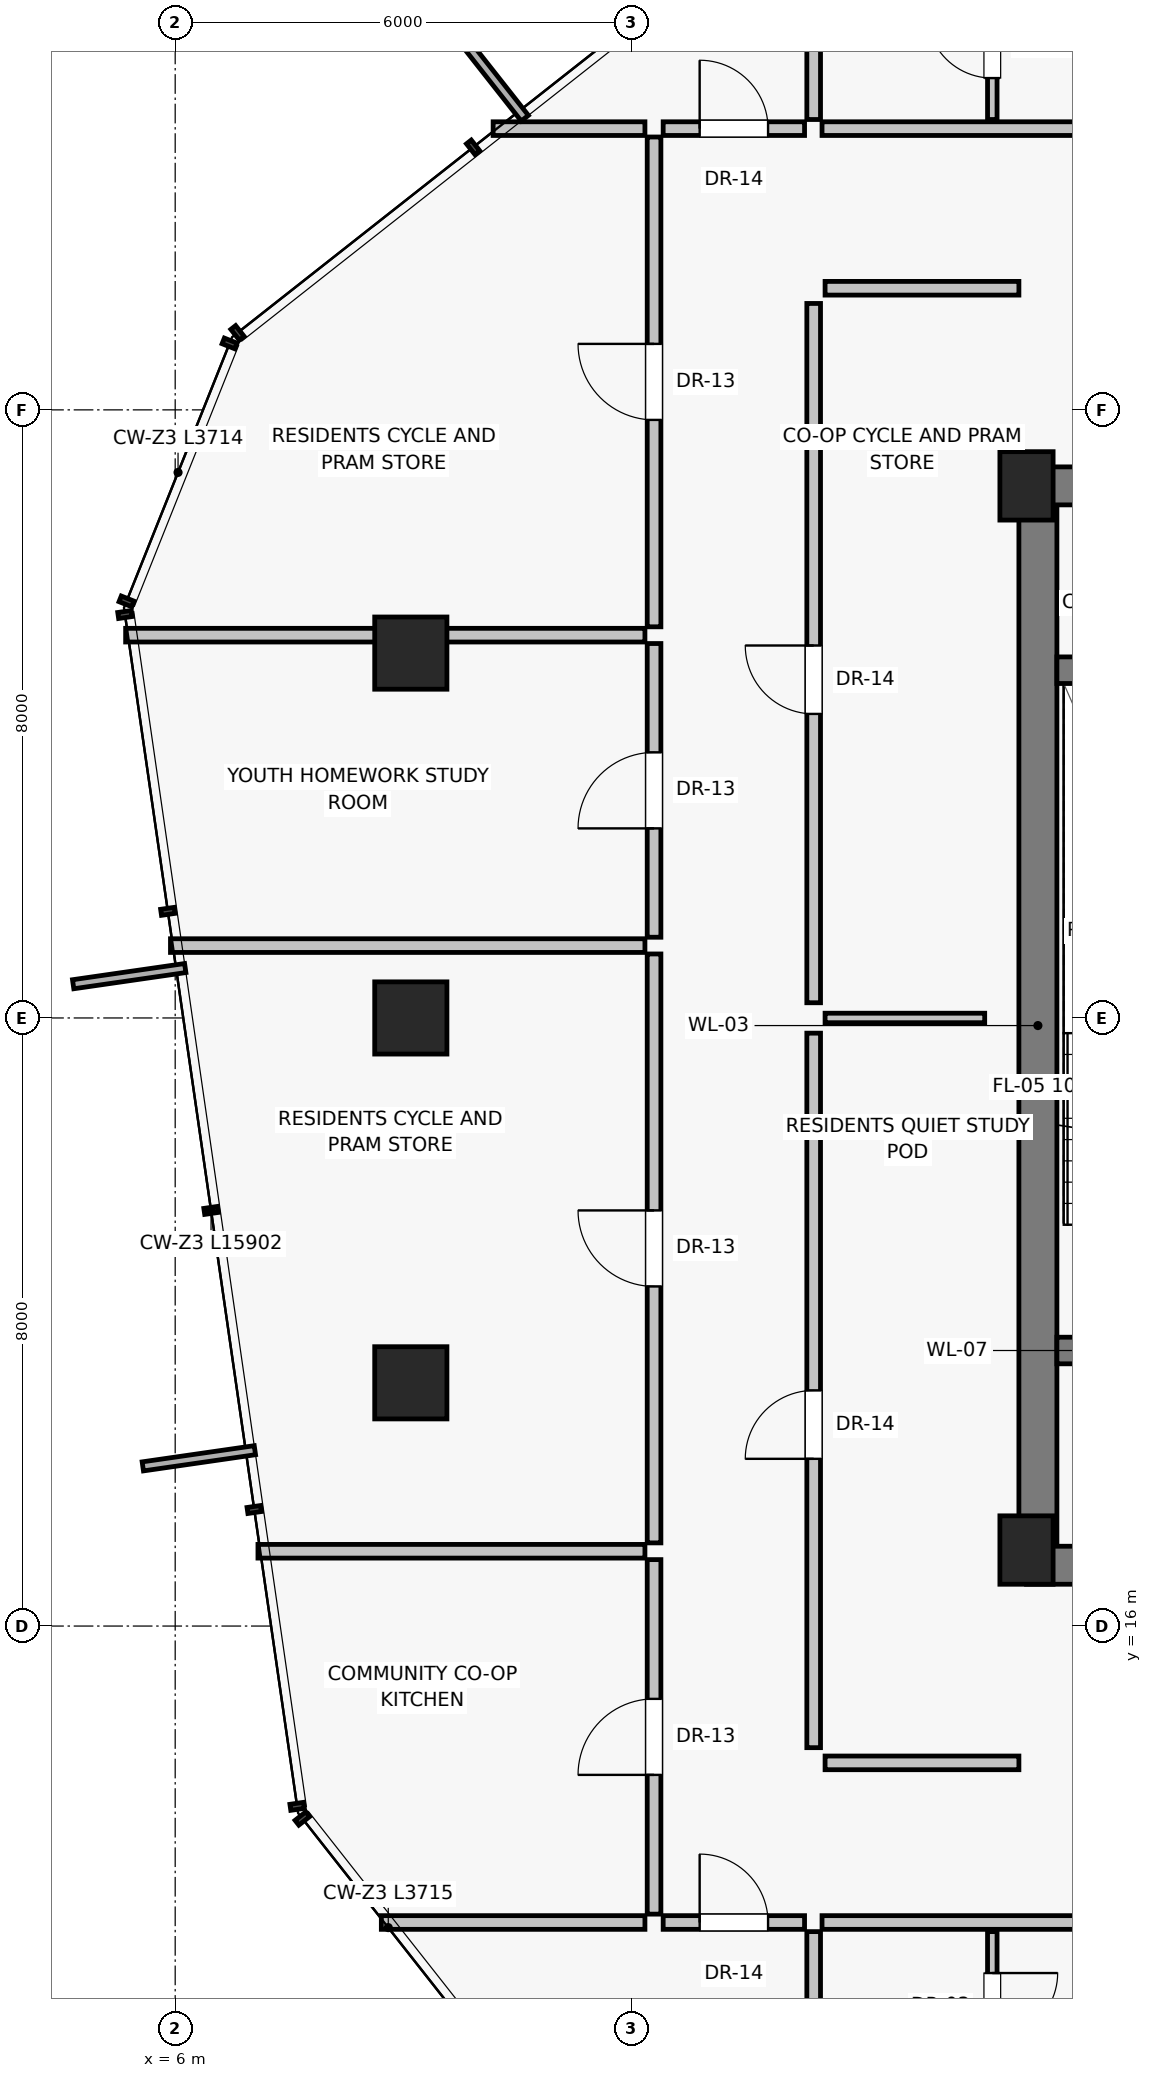
"""IFC4 building model, lengths in metres.
Left out: names, types, materials, properties, quantities, classifications, styles, units other than length and angle.
Written with IfcOpenShell. Run it as: python <this file> out.ifc"""

import sys

from ifc_helpers import new_model, si_unit, direction, frame, frame_2d, origin, origin_2d, place, context, subcontext, project, spatial, rectangle, extrude, source, transform, mapped, element, fill, save


model = new_model("IFC4")
c1 = context("Model", 3, precision=1e-05, world=origin(), true_north=direction((0.0, 1.0)))
c2 = subcontext(c1, "Body", "Model", "MODEL_VIEW")
j1 = project(units=[si_unit("LENGTHUNIT", "METRE"), si_unit("PLANEANGLEUNIT", "RADIAN")], contexts=[c1])
p1 = place(None, origin())
s1 = spatial("IfcSite", under=j1, at=p1, CompositionType="ELEMENT")
p2 = place(p1, origin())
s2 = spatial("IfcBuilding", under=s1, at=p2, CompositionType="ELEMENT")
p3 = place(p2, frame((0.0, 0.0, 178.85)))
s3 = spatial("IfcBuildingStorey", under=s2, at=p3, CompositionType="ELEMENT", Elevation=178.85)
for number, where, z_axis, x_axis in (
    (1, (17.2, 17.0, 0.0), (0.0, 0.0, 1.0), (1.0, 0.0, 0.0)),
    (2, (17.2, 31.0, 0.0), (0.0, 0.0, 1.0), (1.0, 0.0, 0.0)),
):
    element("IfcColumn", number, at=place(p3, frame(where, z_axis=z_axis, x_axis=x_axis)), inside=s3, PredefinedType="PILASTER", context=c2, shape_type="SweptSolid", body=[
        extrude(rectangle(XDim=0.7, YDim=0.9, at=origin_2d()), origin(), (0.0, 0.0, 1.0), 3.25),
    ])
for number, where, z_axis, x_axis in (
    (3, (9.1, 28.8, 0.0), (0.0, 0.0, 1.0), (1.0, 0.0, 0.0)),
    (4, (9.1, 24.0, 0.0), (0.0, 0.0, 1.0), (1.0, 0.0, 0.0)),
    (5, (9.1, 19.2, 0.0), (0.0, 0.0, 1.0), (1.0, 0.0, 0.0)),
):
    element("IfcColumn", number, at=place(p3, frame(where, z_axis=z_axis, x_axis=x_axis)), inside=s3, PredefinedType="COLUMN", context=c2, shape_type="SweptSolid", body=[
        extrude(rectangle(XDim=0.95, YDim=0.95, at=origin_2d()), origin(), (0.0, 0.0, 1.0), 3.25),
    ])
p4 = place(p3, frame((17.35, 16.8, 0.0), z_axis=(0.0, 0.0, 1.0), x_axis=(0.0, 1.0, 0.0)))
e6 = element("IfcWall", 6, at=p4, inside=s3, PredefinedType="SHEAR", context=c2, shape_type="SweptSolid", body=[
    extrude(rectangle(XDim=14.2, YDim=0.5, at=frame_2d((7.1, 0.0))), origin(), (0.0, 0.0, 1.0), 3.015),
])
p5 = place(p3, frame((17.2, 16.8, 0.0), z_axis=(0.0, 0.0, 1.0), x_axis=(1.0, 0.0, 0.0)))
e7 = element("IfcWall", 7, at=p5, inside=s3, PredefinedType="SHEAR", context=c2, shape_type="SweptSolid", body=[
    extrude(rectangle(XDim=5.85, YDim=0.5, at=frame_2d((2.925, 0.0))), origin(), (0.0, 0.0, 1.0), 3.015),
])
p6 = place(p5, frame((1.15, 0.0, 0.0)))
e8 = element("IfcOpeningElement", 8, at=p6, cuts=e7, PredefinedType="OPENING", context=c2, shape_type="SweptSolid", body=[
    extrude(rectangle(XDim=1.2, YDim=2.03, at=frame_2d((0.6, 1.015))), frame((0.0, 0.26, 0.0), z_axis=(0.0, -1.0, 0.0), x_axis=(1.0, 0.0, 0.0)), (0.0, 0.0, 1.0), 0.52),
])
p7 = place(p3, frame((17.2, 31.0, 0.0), z_axis=(0.0, 0.0, 1.0), x_axis=(1.0, 0.0, 0.0)))
e9 = element("IfcWall", 9, at=p7, inside=s3, PredefinedType="SHEAR", context=c2, shape_type="SweptSolid", body=[
    extrude(rectangle(XDim=3.8, YDim=0.5, at=frame_2d((1.9, 0.0))), origin(), (0.0, 0.0, 1.0), 3.015),
])
p8 = place(p7, frame((1.25, 0.0, 0.0)))
e10 = element("IfcOpeningElement", 10, at=p8, cuts=e9, PredefinedType="OPENING", context=c2, shape_type="SweptSolid", body=[
    extrude(rectangle(XDim=0.86, YDim=2.01, at=frame_2d((0.43, 1.005))), frame((0.0, 0.26, 0.0), z_axis=(0.0, -1.0, 0.0), x_axis=(1.0, 0.0, 0.0)), (0.0, 0.0, 1.0), 0.52),
])
p9 = place(p3, frame((17.6, 19.625, 0.0), z_axis=(0.0, 0.0, 1.0), x_axis=(1.0, 0.0, 0.0)))
e11 = element("IfcWall", 11, at=p9, inside=s3, PredefinedType="SHEAR", context=c2, shape_type="SweptSolid", body=[
    extrude(rectangle(XDim=3.375, YDim=0.35, at=frame_2d((1.688, 0.0))), origin(), (0.0, 0.0, 1.0), 3.015),
])
p10 = place(p9, frame((1.05, 0.0, 0.0)))
e12 = element("IfcOpeningElement", 12, at=p10, cuts=e11, PredefinedType="OPENING", context=c2, shape_type="SweptSolid", body=[
    extrude(rectangle(XDim=1.1, YDim=2.03, at=frame_2d((0.55, 1.015))), frame((0.0, 0.185, 0.0), z_axis=(0.0, -1.0, 0.0), x_axis=(1.0, 0.0, 0.0)), (0.0, 0.0, 1.0), 0.37),
])
p11 = place(p3, frame((17.6, 28.575, 0.0), z_axis=(0.0, 0.0, 1.0), x_axis=(1.0, 0.0, 0.0)))
e13 = element("IfcWall", 13, at=p11, inside=s3, PredefinedType="SHEAR", context=c2, shape_type="SweptSolid", body=[
    extrude(rectangle(XDim=3.375, YDim=0.35, at=frame_2d((1.688, 0.0))), origin(), (0.0, 0.0, 1.0), 3.015),
])
p12 = place(p3, frame((14.4, 14.4, 0.0), z_axis=(0.0, 0.0, 1.0), x_axis=(0.0, 1.0, 0.0)))
e14 = element("IfcWall", 14, at=p12, inside=s3, PredefinedType="PARTITIONING", context=c2, shape_type="SweptSolid", body=[
    extrude(rectangle(XDim=9.4, YDim=0.18, at=frame_2d((4.7, 0.0))), origin(), (0.0, 0.0, 1.0), 3.015),
])
p13 = place(p12, frame((3.8, 0.0, 0.0)))
e15 = element("IfcOpeningElement", 15, at=p13, cuts=e14, PredefinedType="OPENING", context=c2, shape_type="SweptSolid", body=[
    extrude(rectangle(XDim=0.9, YDim=2.01, at=frame_2d((0.45, 1.005))), frame((0.0, 0.1, 0.0), z_axis=(0.0, -1.0, 0.0), x_axis=(1.0, 0.0, 0.0)), (0.0, 0.0, 1.0), 0.2),
])
p14 = place(p3, frame((14.4, 24.2, 0.0), z_axis=(0.0, 0.0, 1.0), x_axis=(0.0, 1.0, 0.0)))
e16 = element("IfcWall", 16, at=p14, inside=s3, PredefinedType="PARTITIONING", context=c2, shape_type="SweptSolid", body=[
    extrude(rectangle(XDim=9.2, YDim=0.18, at=frame_2d((4.6, 0.0))), origin(), (0.0, 0.0, 1.0), 3.015),
])
p15 = place(p14, frame((3.8, 0.0, 0.0)))
e17 = element("IfcOpeningElement", 17, at=p15, cuts=e16, PredefinedType="OPENING", context=c2, shape_type="SweptSolid", body=[
    extrude(rectangle(XDim=0.9, YDim=2.01, at=frame_2d((0.45, 1.005))), frame((0.0, 0.1, 0.0), z_axis=(0.0, -1.0, 0.0), x_axis=(1.0, 0.0, 0.0)), (0.0, 0.0, 1.0), 0.2),
])
p16 = place(p3, frame((14.55, 24.0, 0.0), z_axis=(0.0, 0.0, 1.0), x_axis=(1.0, 0.0, 0.0)))
e18 = element("IfcWall", 18, at=p16, inside=s3, PredefinedType="PARTITIONING", context=c2, shape_type="SweptSolid", body=[
    extrude(rectangle(XDim=2.1, YDim=0.125, at=frame_2d((1.05, 0.0))), origin(), (0.0, 0.0, 1.0), 3.015),
])
for number, where, z_axis, x_axis in (
    (19, (14.55, 14.2, 0.0), (0.0, 0.0, 1.0), (1.0, 0.0, 0.0)),
    (20, (14.55, 33.6, 0.0), (0.0, 0.0, 1.0), (1.0, 0.0, 0.0)),
):
    element("IfcWall", number, at=place(p3, frame(where, z_axis=z_axis, x_axis=x_axis)), inside=s3, PredefinedType="PARTITIONING", context=c2, shape_type="SweptSolid", body=[
        extrude(rectangle(XDim=2.55, YDim=0.18, at=frame_2d((1.275, 0.0))), origin(), (0.0, 0.0, 1.0), 3.015),
    ])
p17 = place(p3, frame((14.4, 11.98, 0.0), z_axis=(0.0, 0.0, 1.0), x_axis=(0.0, -1.0, 0.0)))
e21 = element("IfcWall", 21, at=p17, inside=s3, PredefinedType="PARTITIONING", context=c2, shape_type="SweptSolid", body=[
    extrude(rectangle(XDim=3.248, YDim=0.18, at=frame_2d((1.624, 0.0))), origin(), (0.0, 0.0, 1.0), 3.015),
])
p18 = place(p3, frame((14.51, 12.1, 0.0), z_axis=(0.0, 0.0, 1.0), x_axis=(1.0, 0.0, 0.0)))
e22 = element("IfcWall", 22, at=p18, inside=s3, PredefinedType="PARTITIONING", context=c2, shape_type="SweptSolid", body=[
    extrude(rectangle(XDim=7.174, YDim=0.18, at=frame_2d((3.587, 0.0))), origin(), (0.0, 0.0, 1.0), 3.015),
])
p19 = place(p18, frame((4.51, 0.0, 0.0)))
e23 = element("IfcOpeningElement", 23, at=p19, cuts=e22, PredefinedType="OPENING", context=c2, shape_type="SweptSolid", body=[
    extrude(rectangle(XDim=0.95, YDim=2.02, at=frame_2d((0.475, 1.01))), frame((0.0, 0.1, 0.0), z_axis=(0.0, -1.0, 0.0), x_axis=(1.0, 0.0, 0.0)), (0.0, 0.0, 1.0), 0.2),
])
p20 = place(p3, frame((16.75, 11.98, 0.0), z_axis=(0.0, 0.0, 1.0), x_axis=(0.0, -1.0, 0.0)))
e24 = element("IfcWall", 24, at=p20, inside=s3, PredefinedType="PARTITIONING", context=c2, shape_type="SweptSolid", body=[
    extrude(rectangle(XDim=1.95, YDim=0.125, at=frame_2d((0.975, 0.0))), origin(), (0.0, 0.0, 1.0), 3.015),
])
p21 = place(p20, frame((0.545, 0.0, 0.0)))
e25 = element("IfcOpeningElement", 25, at=p21, cuts=e24, PredefinedType="OPENING", context=c2, shape_type="SweptSolid", body=[
    extrude(rectangle(XDim=0.86, YDim=2.01, at=frame_2d((0.43, 1.005))), frame((0.0, 0.073, 0.0), z_axis=(0.0, -1.0, 0.0), x_axis=(1.0, 0.0, 0.0)), (0.0, 0.0, 1.0), 0.145),
])
p22 = place(p3, frame((14.4, 35.82, 0.0), z_axis=(0.0, 0.0, 1.0), x_axis=(0.0, 1.0, 0.0)))
e26 = element("IfcWall", 26, at=p22, inside=s3, PredefinedType="PARTITIONING", context=c2, shape_type="SweptSolid", body=[
    extrude(rectangle(XDim=3.201, YDim=0.18, at=frame_2d((1.6, 0.0))), origin(), (0.0, 0.0, 1.0), 3.015),
])
p23 = place(p3, frame((14.51, 35.7, 0.0), z_axis=(0.0, 0.0, 1.0), x_axis=(1.0, 0.0, 0.0)))
e27 = element("IfcWall", 27, at=p23, inside=s3, PredefinedType="PARTITIONING", context=c2, shape_type="SweptSolid", body=[
    extrude(rectangle(XDim=5.936, YDim=0.18, at=frame_2d((2.968, 0.0))), origin(), (0.0, 0.0, 1.0), 3.015),
])
p24 = place(p23, frame((3.594, 0.0, 0.0)))
e28 = element("IfcOpeningElement", 28, at=p24, cuts=e27, PredefinedType="OPENING", context=c2, shape_type="SweptSolid", body=[
    extrude(rectangle(XDim=0.95, YDim=2.02, at=frame_2d((0.475, 1.01))), frame((0.0, 0.1, 0.0), z_axis=(0.0, -1.0, 0.0), x_axis=(1.0, 0.0, 0.0)), (0.0, 0.0, 1.0), 0.2),
])
p25 = place(p3, frame((16.75, 35.82, 0.0), z_axis=(0.0, 0.0, 1.0), x_axis=(0.0, 1.0, 0.0)))
e29 = element("IfcWall", 29, at=p25, inside=s3, PredefinedType="PARTITIONING", context=c2, shape_type="SweptSolid", body=[
    extrude(rectangle(XDim=1.95, YDim=0.125, at=frame_2d((0.975, 0.0))), origin(), (0.0, 0.0, 1.0), 3.015),
])
p26 = place(p25, frame((0.545, 0.0, 0.0)))
e30 = element("IfcOpeningElement", 30, at=p26, cuts=e29, PredefinedType="OPENING", context=c2, shape_type="SweptSolid", body=[
    extrude(rectangle(XDim=0.86, YDim=2.01, at=frame_2d((0.43, 1.005))), frame((0.0, 0.073, 0.0), z_axis=(0.0, -1.0, 0.0), x_axis=(1.0, 0.0, 0.0)), (0.0, 0.0, 1.0), 0.145),
])
p27 = place(p3, frame((12.18, 12.1, 0.0), z_axis=(0.0, 0.0, 1.0), x_axis=(-1.0, 0.0, 0.0)))
e31 = element("IfcWall", 31, at=p27, inside=s3, PredefinedType="PARTITIONING", context=c2, shape_type="SweptSolid", body=[
    extrude(rectangle(XDim=3.468, YDim=0.18, at=frame_2d((1.734, 0.0))), origin(), (0.0, 0.0, 1.0), 3.015),
])
p28 = place(p3, frame((12.18, 35.7, 0.0), z_axis=(0.0, 0.0, 1.0), x_axis=(-1.0, 0.0, 0.0)))
e32 = element("IfcWall", 32, at=p28, inside=s3, PredefinedType="PARTITIONING", context=c2, shape_type="SweptSolid", body=[
    extrude(rectangle(XDim=1.997, YDim=0.18, at=frame_2d((0.999, 0.0))), origin(), (0.0, 0.0, 1.0), 3.015),
])
p29 = place(p3, frame((12.3, 12.21, 0.0), z_axis=(0.0, 0.0, 1.0), x_axis=(0.0, 1.0, 0.0)))
e33 = element("IfcWall", 33, at=p29, inside=s3, PredefinedType="PARTITIONING", context=c2, shape_type="SweptSolid", body=[
    extrude(rectangle(XDim=4.664, YDim=0.18, at=frame_2d((2.332, 0.0))), origin(), (0.0, 0.0, 1.0), 3.015),
])
p30 = place(p29, frame((1.832, 0.0, 0.0)))
e34 = element("IfcOpeningElement", 34, at=p30, cuts=e33, PredefinedType="OPENING", context=c2, shape_type="SweptSolid", body=[
    extrude(rectangle(XDim=1.0, YDim=2.01, at=frame_2d((0.5, 1.005))), frame((0.0, 0.1, 0.0), z_axis=(0.0, -1.0, 0.0), x_axis=(1.0, 0.0, 0.0)), (0.0, 0.0, 1.0), 0.2),
])
p31 = place(p3, frame((12.3, 17.094, 0.0), z_axis=(0.0, 0.0, 1.0), x_axis=(0.0, 1.0, 0.0)))
e35 = element("IfcWall", 35, at=p31, inside=s3, PredefinedType="PARTITIONING", context=c2, shape_type="SweptSolid", body=[
    extrude(rectangle(XDim=7.748, YDim=0.18, at=frame_2d((3.874, 0.0))), origin(), (0.0, 0.0, 1.0), 3.015),
])
p32 = place(p31, frame((3.374, 0.0, 0.0)))
e36 = element("IfcOpeningElement", 36, at=p32, cuts=e35, PredefinedType="OPENING", context=c2, shape_type="SweptSolid", body=[
    extrude(rectangle(XDim=1.0, YDim=2.01, at=frame_2d((0.5, 1.005))), frame((0.0, 0.1, 0.0), z_axis=(0.0, -1.0, 0.0), x_axis=(1.0, 0.0, 0.0)), (0.0, 0.0, 1.0), 0.2),
])
p33 = place(p3, frame((12.18, 16.984, 0.0), z_axis=(0.0, 0.0, 1.0), x_axis=(-1.0, 0.0, 0.0)))
e37 = element("IfcWall", 37, at=p33, inside=s3, PredefinedType="PARTITIONING", context=c2, shape_type="SweptSolid", body=[
    extrude(rectangle(XDim=5.091, YDim=0.18, at=frame_2d((2.545, 0.0))), origin(), (0.0, 0.0, 1.0), 3.015),
])
p34 = place(p3, frame((12.18, 24.952, 0.0), z_axis=(0.0, 0.0, 1.0), x_axis=(-1.0, 0.0, 0.0)))
e38 = element("IfcWall", 38, at=p34, inside=s3, PredefinedType="PARTITIONING", context=c2, shape_type="SweptSolid", body=[
    extrude(rectangle(XDim=6.242, YDim=0.18, at=frame_2d((3.121, 0.0))), origin(), (0.0, 0.0, 1.0), 3.015),
])
p35 = place(p3, frame((12.3, 25.062, 0.0), z_axis=(0.0, 0.0, 1.0), x_axis=(0.0, 1.0, 0.0)))
e39 = element("IfcWall", 39, at=p35, inside=s3, PredefinedType="PARTITIONING", context=c2, shape_type="SweptSolid", body=[
    extrude(rectangle(XDim=3.864, YDim=0.18, at=frame_2d((1.932, 0.0))), origin(), (0.0, 0.0, 1.0), 3.015),
])
p36 = place(p35, frame((1.432, 0.0, 0.0)))
e40 = element("IfcOpeningElement", 40, at=p36, cuts=e39, PredefinedType="OPENING", context=c2, shape_type="SweptSolid", body=[
    extrude(rectangle(XDim=1.0, YDim=2.01, at=frame_2d((0.5, 1.005))), frame((0.0, 0.1, 0.0), z_axis=(0.0, -1.0, 0.0), x_axis=(1.0, 0.0, 0.0)), (0.0, 0.0, 1.0), 0.2),
])
p37 = place(p3, frame((12.3, 29.146, 0.0), z_axis=(0.0, 0.0, 1.0), x_axis=(0.0, 1.0, 0.0)))
e41 = element("IfcWall", 41, at=p37, inside=s3, PredefinedType="PARTITIONING", context=c2, shape_type="SweptSolid", body=[
    extrude(rectangle(XDim=6.444, YDim=0.18, at=frame_2d((3.222, 0.0))), origin(), (0.0, 0.0, 1.0), 3.015),
])
p38 = place(p37, frame((2.722, 0.0, 0.0)))
e42 = element("IfcOpeningElement", 42, at=p38, cuts=e41, PredefinedType="OPENING", context=c2, shape_type="SweptSolid", body=[
    extrude(rectangle(XDim=1.0, YDim=2.01, at=frame_2d((0.5, 1.005))), frame((0.0, 0.1, 0.0), z_axis=(0.0, -1.0, 0.0), x_axis=(1.0, 0.0, 0.0)), (0.0, 0.0, 1.0), 0.2),
])
p39 = place(p3, frame((12.18, 29.036, 0.0), z_axis=(0.0, 0.0, 1.0), x_axis=(-1.0, 0.0, 0.0)))
e43 = element("IfcWall", 43, at=p39, inside=s3, PredefinedType="PARTITIONING", context=c2, shape_type="SweptSolid", body=[
    extrude(rectangle(XDim=6.832, YDim=0.18, at=frame_2d((3.416, 0.0))), origin(), (0.0, 0.0, 1.0), 2.469),
])
p40 = place(p3, frame((12.42, 12.1, 0.0), z_axis=(0.0, 0.0, 1.0), x_axis=(1.0, 0.0, 0.0)))
e44 = element("IfcWall", 44, at=p40, inside=s3, PredefinedType="PARTITIONING", context=c2, shape_type="SweptSolid", body=[
    extrude(rectangle(XDim=1.86, YDim=0.18, at=frame_2d((0.93, 0.0))), origin(), (0.0, 0.0, 1.0), 3.015),
])
p41 = place(p40, frame((0.48, 0.0, 0.0)))
e45 = element("IfcOpeningElement", 45, at=p41, cuts=e44, PredefinedType="OPENING", context=c2, shape_type="SweptSolid", body=[
    extrude(rectangle(XDim=0.9, YDim=2.01, at=frame_2d((0.45, 1.005))), frame((0.0, 0.1, 0.0), z_axis=(0.0, -1.0, 0.0), x_axis=(1.0, 0.0, 0.0)), (0.0, 0.0, 1.0), 0.2),
])
p42 = place(p3, frame((12.42, 35.7, 0.0), z_axis=(0.0, 0.0, 1.0), x_axis=(1.0, 0.0, 0.0)))
e46 = element("IfcWall", 46, at=p42, inside=s3, PredefinedType="PARTITIONING", context=c2, shape_type="SweptSolid", body=[
    extrude(rectangle(XDim=1.86, YDim=0.18, at=frame_2d((0.93, 0.0))), origin(), (0.0, 0.0, 1.0), 3.015),
])
p43 = place(p42, frame((0.48, 0.0, 0.0)))
e47 = element("IfcOpeningElement", 47, at=p43, cuts=e46, PredefinedType="OPENING", context=c2, shape_type="SweptSolid", body=[
    extrude(rectangle(XDim=0.9, YDim=2.01, at=frame_2d((0.45, 1.005))), frame((0.0, 0.1, 0.0), z_axis=(0.0, -1.0, 0.0), x_axis=(1.0, 0.0, 0.0)), (0.0, 0.0, 1.0), 0.2),
])
m1 = source(origin(), c2, "Body", "SweptSolid", [
    extrude(rectangle(XDim=0.9, YDim=2.01, at=frame_2d((0.45, 1.005))), frame((0.0, 0.025, 0.0), z_axis=(0.0, -1.0, 0.0), x_axis=(1.0, 0.0, 0.0)), (0.0, 0.0, 1.0), 0.05),
])
p44 = place(p13, origin())
e48 = element("IfcDoor", 48, at=p44, inside=s3, OperationType="SINGLE_SWING_LEFT", PredefinedType="DOOR", context=c2, shape_type="MappedRepresentation", body=[
    mapped(m1, transform((0.0, 0.0, 0.0), scale=1.0)),
])
fill(e15, e48)
p45 = place(p15, origin())
e49 = element("IfcDoor", 49, at=p45, inside=s3, OperationType="SINGLE_SWING_RIGHT", PredefinedType="DOOR", context=c2, shape_type="MappedRepresentation", body=[
    mapped(m1, transform((0.0, 0.0, 0.0), scale=1.0)),
])
fill(e17, e49)
m2 = source(origin(), c2, "Body", "SweptSolid", [
    extrude(rectangle(XDim=0.86, YDim=2.01, at=frame_2d((0.43, 1.005))), frame((0.0, 0.025, 0.0), z_axis=(0.0, -1.0, 0.0), x_axis=(1.0, 0.0, 0.0)), (0.0, 0.0, 1.0), 0.05),
])
p46 = place(p21, origin())
e50 = element("IfcDoor", 50, at=p46, inside=s3, OperationType="SINGLE_SWING_LEFT", PredefinedType="DOOR", context=c2, shape_type="MappedRepresentation", body=[
    mapped(m2, transform((0.0, 0.0, 0.0), scale=1.0)),
])
fill(e25, e50)
p47 = place(p26, origin())
e51 = element("IfcDoor", 51, at=p47, inside=s3, OperationType="SINGLE_SWING_RIGHT", PredefinedType="DOOR", context=c2, shape_type="MappedRepresentation", body=[
    mapped(m2, transform((0.0, 0.0, 0.0), scale=1.0)),
])
fill(e30, e51)
m3 = source(origin(), c2, "Body", "SweptSolid", [
    extrude(rectangle(XDim=1.0, YDim=2.01, at=frame_2d((0.5, 1.005))), frame((0.0, 0.025, 0.0), z_axis=(0.0, -1.0, 0.0), x_axis=(1.0, 0.0, 0.0)), (0.0, 0.0, 1.0), 0.05),
])
p48 = place(p30, origin())
e52 = element("IfcDoor", 52, at=p48, inside=s3, OperationType="SINGLE_SWING_LEFT", PredefinedType="DOOR", context=c2, shape_type="MappedRepresentation", body=[
    mapped(m3, transform((0.0, 0.0, 0.0), scale=1.0)),
])
fill(e34, e52)
p49 = place(p32, origin())
e53 = element("IfcDoor", 53, at=p49, inside=s3, OperationType="SINGLE_SWING_RIGHT", PredefinedType="DOOR", context=c2, shape_type="MappedRepresentation", body=[
    mapped(m3, transform((0.0, 0.0, 0.0), scale=1.0)),
])
fill(e36, e53)
p50 = place(p36, origin())
e54 = element("IfcDoor", 54, at=p50, inside=s3, OperationType="SINGLE_SWING_LEFT", PredefinedType="DOOR", context=c2, shape_type="MappedRepresentation", body=[
    mapped(m3, transform((0.0, 0.0, 0.0), scale=1.0)),
])
fill(e40, e54)
p51 = place(p38, origin())
e55 = element("IfcDoor", 55, at=p51, inside=s3, OperationType="SINGLE_SWING_RIGHT", PredefinedType="DOOR", context=c2, shape_type="MappedRepresentation", body=[
    mapped(m3, transform((0.0, 0.0, 0.0), scale=1.0)),
])
fill(e42, e55)
p52 = place(p41, origin())
e56 = element("IfcDoor", 56, at=p52, inside=s3, OperationType="SINGLE_SWING_LEFT", PredefinedType="DOOR", context=c2, shape_type="MappedRepresentation", body=[
    mapped(m1, transform((0.0, 0.0, 0.0), scale=1.0)),
])
fill(e45, e56)
p53 = place(p43, origin())
e57 = element("IfcDoor", 57, at=p53, inside=s3, OperationType="SINGLE_SWING_LEFT", PredefinedType="DOOR", context=c2, shape_type="MappedRepresentation", body=[
    mapped(m1, transform((0.0, 0.0, 0.0), scale=1.0)),
])
fill(e47, e57)
save(model, sys.argv[1])
